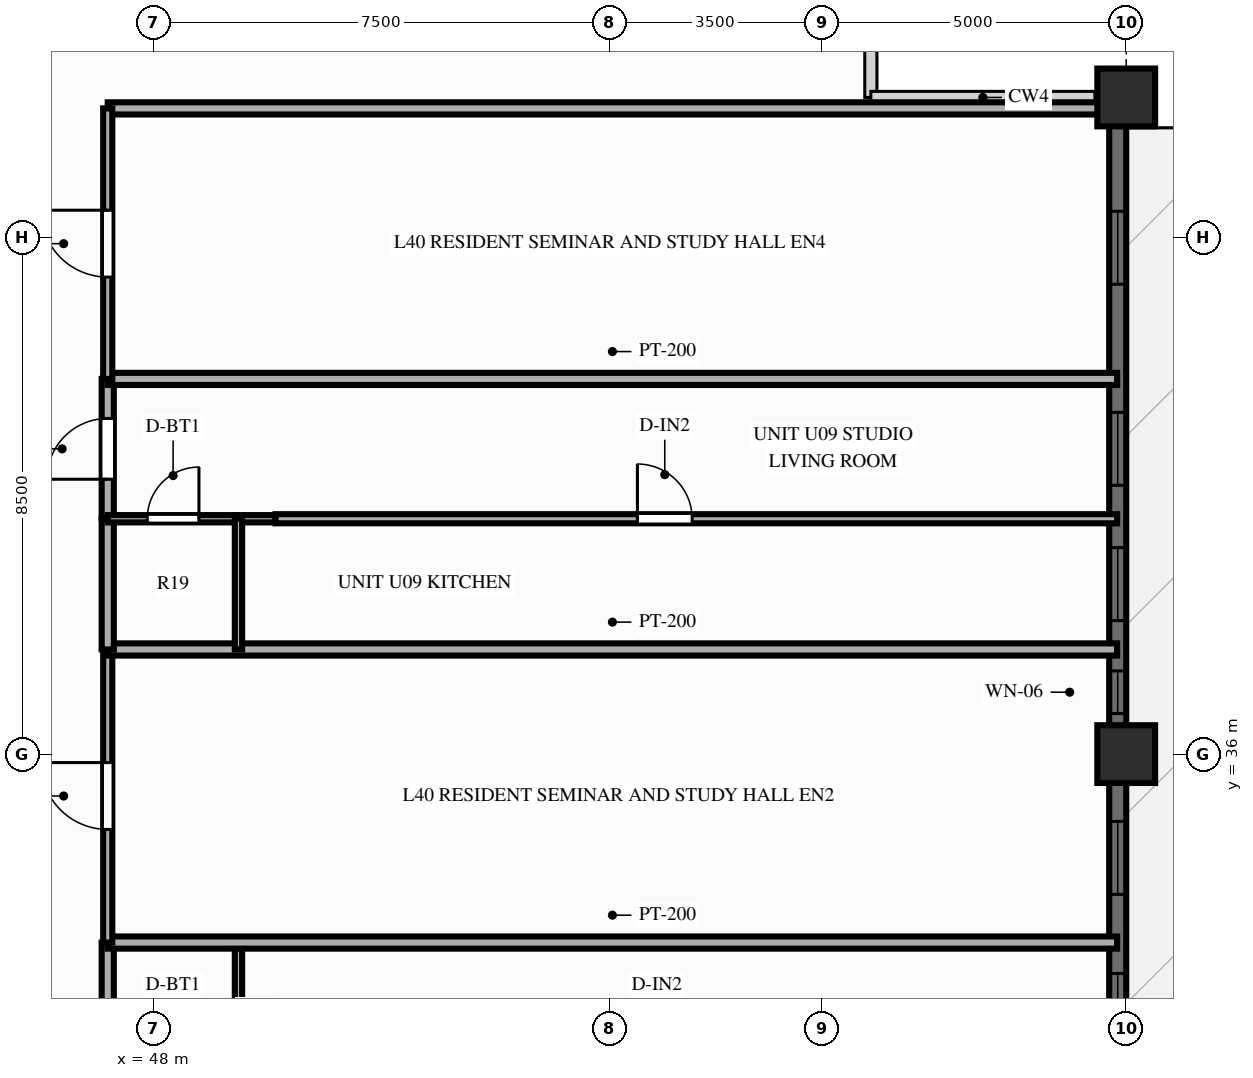
"""IFC4 building model, lengths in metres.
Left out: names, types, materials, properties, quantities, classifications, styles, units other than length and angle.
Written with IfcOpenShell. Run it as: python <this file> out.ifc"""

import sys

from ifc_helpers import new_model, si_unit, direction, frame, frame_2d, origin, origin_2d, place, context, subcontext, project, spatial, rectangle, extrude, source, transform, mapped, element, fill, save


model = new_model("IFC4")
c1 = context("Model", 3, precision=1e-05, world=origin(), true_north=direction((0.0, 1.0)))
c2 = subcontext(c1, "Body", "Model", "MODEL_VIEW")
j1 = project(units=[si_unit("LENGTHUNIT", "METRE"), si_unit("PLANEANGLEUNIT", "RADIAN")], contexts=[c1])
p1 = place(None, origin())
s1 = spatial("IfcSite", under=j1, at=p1, CompositionType="ELEMENT")
p2 = place(p1, origin())
s2 = spatial("IfcBuilding", under=s1, at=p2, CompositionType="ELEMENT")
p3 = place(p2, frame((0.0, 0.0, 126.75)))
s3 = spatial("IfcBuildingStorey", under=s2, at=p3, CompositionType="ELEMENT", Elevation=126.75)
m1 = source(origin(), c2, "Body", "SweptSolid", [
    extrude(rectangle(XDim=0.95, YDim=0.95, at=origin_2d()), origin(), (0.0, 0.0, 1.0), 3.0),
])
for number, where, z_axis, x_axis in (
    (1, (64.0, 36.0, 0.0), (0.0, 0.0, 1.0), (1.0, 0.0, 0.0)),
    (2, (64.0, 46.8, 0.0), (0.0, 0.0, 1.0), (1.0, 0.0, 0.0)),
):
    element("IfcColumn", number, at=place(p3, frame(where, z_axis=z_axis, x_axis=x_axis)), inside=s3, PredefinedType="COLUMN", context=c2, shape_type="MappedRepresentation", body=[
        mapped(m1, transform((0.0, 0.0, 0.0), scale=1.0)),
    ])
p4 = place(p3, frame((63.86, 7.2, 0.0), z_axis=(0.0, 0.0, 1.0), x_axis=(0.0, 1.0, 0.0)))
e3 = element("IfcWall", 3, at=p4, inside=s3, PredefinedType="SOLIDWALL", context=c2, shape_type="SweptSolid", body=[
    extrude(rectangle(XDim=39.6, YDim=0.28, at=frame_2d((19.8, 0.0))), origin(), (0.0, 0.0, 1.0), 2.28),
])
p5 = place(p4, frame((5.683, 0.0, 0.0), z_axis=(0.0, 0.0, 1.0), x_axis=(-1.0, 0.0, 0.0)))
e4 = element("IfcOpeningElement", 4, at=p5, cuts=e3, PredefinedType="OPENING", context=c2, shape_type="SweptSolid", body=[
    extrude(rectangle(XDim=1.6, YDim=2.15, at=frame_2d((0.8, 1.075))), frame((0.0, 0.152, 0.0), z_axis=(0.0, -1.0, 0.0), x_axis=(1.0, 0.0, 0.0)), (0.0, 0.0, 1.0), 0.304),
])
p6 = place(p4, frame((13.483, 0.0, 0.25)))
e5 = element("IfcOpeningElement", 5, at=p6, cuts=e3, PredefinedType="OPENING", context=c2, shape_type="SweptSolid", body=[
    extrude(rectangle(XDim=1.2, YDim=1.5, at=frame_2d((0.6, 0.75))), frame((0.0, 0.152, 0.0), z_axis=(0.0, -1.0, 0.0), x_axis=(1.0, 0.0, 0.0)), (0.0, 0.0, 1.0), 0.304),
])
p7 = place(p4, frame((16.82, 0.0, 0.25)))
e6 = element("IfcOpeningElement", 6, at=p7, cuts=e3, PredefinedType="OPENING", context=c2, shape_type="SweptSolid", body=[
    extrude(rectangle(XDim=1.2, YDim=1.5, at=frame_2d((0.6, 0.75))), frame((0.0, 0.152, 0.0), z_axis=(0.0, -1.0, 0.0), x_axis=(1.0, 0.0, 0.0)), (0.0, 0.0, 1.0), 0.304),
])
p8 = place(p4, frame((19.2, 0.0, 0.25)))
e7 = element("IfcOpeningElement", 7, at=p8, cuts=e3, PredefinedType="OPENING", context=c2, shape_type="SweptSolid", body=[
    extrude(rectangle(XDim=1.2, YDim=1.5, at=frame_2d((0.6, 0.75))), frame((0.0, 0.152, 0.0), z_axis=(0.0, -1.0, 0.0), x_axis=(1.0, 0.0, 0.0)), (0.0, 0.0, 1.0), 0.304),
])
p9 = place(p4, frame((21.582, 0.0, 0.25)))
e8 = element("IfcOpeningElement", 8, at=p9, cuts=e3, PredefinedType="OPENING", context=c2, shape_type="SweptSolid", body=[
    extrude(rectangle(XDim=1.2, YDim=1.5, at=frame_2d((0.6, 0.75))), frame((0.0, 0.152, 0.0), z_axis=(0.0, -1.0, 0.0), x_axis=(1.0, 0.0, 0.0)), (0.0, 0.0, 1.0), 0.304),
])
p10 = place(p4, frame((23.992, 0.0, 0.25)))
e9 = element("IfcOpeningElement", 9, at=p10, cuts=e3, PredefinedType="OPENING", context=c2, shape_type="SweptSolid", body=[
    extrude(rectangle(XDim=1.2, YDim=1.5, at=frame_2d((0.6, 0.75))), frame((0.0, 0.152, 0.0), z_axis=(0.0, -1.0, 0.0), x_axis=(1.0, 0.0, 0.0)), (0.0, 0.0, 1.0), 0.304),
])
p11 = place(p4, frame((26.493, 0.0, 0.25)))
e10 = element("IfcOpeningElement", 10, at=p11, cuts=e3, PredefinedType="OPENING", context=c2, shape_type="SweptSolid", body=[
    extrude(rectangle(XDim=1.2, YDim=1.5, at=frame_2d((0.6, 0.75))), frame((0.0, 0.152, 0.0), z_axis=(0.0, -1.0, 0.0), x_axis=(1.0, 0.0, 0.0)), (0.0, 0.0, 1.0), 0.304),
])
p12 = place(p4, frame((29.468, 0.0, 0.25)))
e11 = element("IfcOpeningElement", 11, at=p12, cuts=e3, PredefinedType="OPENING", context=c2, shape_type="SweptSolid", body=[
    extrude(rectangle(XDim=0.7, YDim=1.5, at=frame_2d((0.35, 0.75))), frame((0.0, 0.152, 0.0), z_axis=(0.0, -1.0, 0.0), x_axis=(1.0, 0.0, 0.0)), (0.0, 0.0, 1.0), 0.304),
])
p13 = place(p4, frame((30.996, 0.0, 0.25)))
e12 = element("IfcOpeningElement", 12, at=p13, cuts=e3, PredefinedType="OPENING", context=c2, shape_type="SweptSolid", body=[
    extrude(rectangle(XDim=1.2, YDim=1.5, at=frame_2d((0.6, 0.75))), frame((0.0, 0.152, 0.0), z_axis=(0.0, -1.0, 0.0), x_axis=(1.0, 0.0, 0.0)), (0.0, 0.0, 1.0), 0.304),
])
p14 = place(p4, frame((33.221, 0.0, 0.25)))
e13 = element("IfcOpeningElement", 13, at=p14, cuts=e3, PredefinedType="OPENING", context=c2, shape_type="SweptSolid", body=[
    extrude(rectangle(XDim=1.2, YDim=1.5, at=frame_2d((0.6, 0.75))), frame((0.0, 0.152, 0.0), z_axis=(0.0, -1.0, 0.0), x_axis=(1.0, 0.0, 0.0)), (0.0, 0.0, 1.0), 0.304),
])
p15 = place(p4, frame((36.528, 0.0, 0.25)))
e14 = element("IfcOpeningElement", 14, at=p15, cuts=e3, PredefinedType="OPENING", context=c2, shape_type="SweptSolid", body=[
    extrude(rectangle(XDim=1.2, YDim=1.5, at=frame_2d((0.6, 0.75))), frame((0.0, 0.152, 0.0), z_axis=(0.0, -1.0, 0.0), x_axis=(1.0, 0.0, 0.0)), (0.0, 0.0, 1.0), 0.304),
])
p16 = place(p3, frame((47.25, 46.62, 0.0), z_axis=(0.0, 0.0, 1.0), x_axis=(1.0, 0.0, 0.0)))
e15 = element("IfcWall", 15, at=p16, inside=s3, PredefinedType="PARTITIONING", context=c2, shape_type="SweptSolid", body=[
    extrude(rectangle(XDim=16.6, YDim=0.2, at=frame_2d((8.3, 0.0))), origin(), (0.0, 0.0, 1.0), 2.79),
])
p17 = place(p3, frame((47.25, 30.683, 0.0), z_axis=(0.0, 0.0, 1.0), x_axis=(0.0, 1.0, 0.0)))
e16 = element("IfcWall", 16, at=p17, inside=s3, PredefinedType="PARTITIONING", context=c2, shape_type="SweptSolid", body=[
    extrude(rectangle(XDim=2.217, YDim=0.2, at=frame_2d((1.109, 0.0))), origin(), (0.0, 0.0, 1.0), 2.79),
])
p18 = place(p3, frame((49.4, 30.683, 0.0), z_axis=(0.0, 0.0, 1.0), x_axis=(0.0, 1.0, 0.0)))
e17 = element("IfcWall", 17, at=p18, inside=s3, PredefinedType="PARTITIONING", context=c2, shape_type="SweptSolid", body=[
    extrude(rectangle(XDim=2.217, YDim=0.12, at=frame_2d((1.109, 0.0))), origin(), (0.0, 0.0, 1.0), 2.79),
])
p19 = place(p3, frame((47.25, 32.9, 0.0), z_axis=(0.0, 0.0, 1.0), x_axis=(1.0, 0.0, 0.0)))
e18 = element("IfcWall", 18, at=p19, inside=s3, PredefinedType="PARTITIONING", context=c2, shape_type="SweptSolid", body=[
    extrude(rectangle(XDim=16.6, YDim=0.2, at=frame_2d((8.3, 0.0))), origin(), (0.0, 0.0, 1.0), 2.79),
])
p20 = place(p3, frame((47.25, 32.9, 0.0), z_axis=(0.0, 0.0, 1.0), x_axis=(0.0, 1.0, 0.0)))
e19 = element("IfcWall", 19, at=p20, inside=s3, PredefinedType="PARTITIONING", context=c2, shape_type="SweptSolid", body=[
    extrude(rectangle(XDim=4.82, YDim=0.15, at=frame_2d((2.41, 0.0))), origin(), (0.0, 0.0, 1.0), 2.79),
])
p21 = place(p20, frame((1.86, 0.0, 0.0)))
e20 = element("IfcOpeningElement", 20, at=p21, cuts=e19, PredefinedType="OPENING", context=c2, shape_type="SweptSolid", body=[
    extrude(rectangle(XDim=1.1, YDim=2.15, at=frame_2d((0.55, 1.075))), frame((0.0, 0.087, 0.0), z_axis=(0.0, -1.0, 0.0), x_axis=(1.0, 0.0, 0.0)), (0.0, 0.0, 1.0), 0.174),
])
p22 = place(p3, frame((47.25, 37.721, 0.0), z_axis=(0.0, 0.0, 1.0), x_axis=(1.0, 0.0, 0.0)))
e21 = element("IfcWall", 21, at=p22, inside=s3, PredefinedType="PARTITIONING", context=c2, shape_type="SweptSolid", body=[
    extrude(rectangle(XDim=16.6, YDim=0.2, at=frame_2d((8.3, 0.0))), origin(), (0.0, 0.0, 1.0), 2.79),
])
p23 = place(p3, frame((47.25, 37.721, 0.0), z_axis=(0.0, 0.0, 1.0), x_axis=(0.0, 1.0, 0.0)))
e22 = element("IfcWall", 22, at=p23, inside=s3, PredefinedType="PARTITIONING", context=c2, shape_type="SweptSolid", body=[
    extrude(rectangle(XDim=2.15, YDim=0.2, at=frame_2d((1.075, 0.0))), origin(), (0.0, 0.0, 1.0), 2.79),
])
p24 = place(p3, frame((47.25, 39.871, 0.0), z_axis=(0.0, 0.0, 1.0), x_axis=(0.0, 1.0, 0.0)))
e23 = element("IfcWall", 23, at=p24, inside=s3, PredefinedType="PARTITIONING", context=c2, shape_type="SweptSolid", body=[
    extrude(rectangle(XDim=2.3, YDim=0.2, at=frame_2d((1.15, 0.0))), origin(), (0.0, 0.0, 1.0), 2.79),
])
p25 = place(p24, frame((0.65, 0.0, 0.0)))
e24 = element("IfcOpeningElement", 24, at=p25, cuts=e23, PredefinedType="OPENING", context=c2, shape_type="SweptSolid", body=[
    extrude(rectangle(XDim=1.0, YDim=2.15, at=frame_2d((0.5, 1.075))), frame((0.0, 0.112, 0.0), z_axis=(0.0, -1.0, 0.0), x_axis=(1.0, 0.0, 0.0)), (0.0, 0.0, 1.0), 0.224),
])
p26 = place(p3, frame((47.25, 39.871, 0.0), z_axis=(0.0, 0.0, 1.0), x_axis=(1.0, 0.0, 0.0)))
e25 = element("IfcWall", 25, at=p26, inside=s3, PredefinedType="PARTITIONING", context=c2, shape_type="SweptSolid", body=[
    extrude(rectangle(XDim=2.15, YDim=0.12, at=frame_2d((1.075, 0.0))), origin(), (0.0, 0.0, 1.0), 2.79),
])
p27 = place(p26, frame((0.65, 0.0, 0.0)))
e26 = element("IfcOpeningElement", 26, at=p27, cuts=e25, PredefinedType="OPENING", context=c2, shape_type="SweptSolid", body=[
    extrude(rectangle(XDim=0.85, YDim=2.05, at=frame_2d((0.425, 1.025))), frame((0.0, 0.072, 0.0), z_axis=(0.0, -1.0, 0.0), x_axis=(1.0, 0.0, 0.0)), (0.0, 0.0, 1.0), 0.144),
])
p28 = place(p3, frame((49.4, 39.871, 0.0), z_axis=(0.0, 0.0, 1.0), x_axis=(1.0, 0.0, 0.0)))
e27 = element("IfcWall", 27, at=p28, inside=s3, PredefinedType="PARTITIONING", context=c2, shape_type="SweptSolid", body=[
    extrude(rectangle(XDim=0.61, YDim=0.12, at=frame_2d((0.305, 0.0))), origin(), (0.0, 0.0, 1.0), 2.79),
])
p29 = place(p3, frame((49.4, 37.721, 0.0), z_axis=(0.0, 0.0, 1.0), x_axis=(0.0, 1.0, 0.0)))
e28 = element("IfcWall", 28, at=p29, inside=s3, PredefinedType="PARTITIONING", context=c2, shape_type="SweptSolid", body=[
    extrude(rectangle(XDim=2.15, YDim=0.12, at=frame_2d((1.075, 0.0))), origin(), (0.0, 0.0, 1.0), 2.79),
])
p30 = place(p3, frame((50.01, 39.871, 0.0), z_axis=(0.0, 0.0, 1.0), x_axis=(1.0, 0.0, 0.0)))
e29 = element("IfcWall", 29, at=p30, inside=s3, PredefinedType="PARTITIONING", context=c2, shape_type="SweptSolid", body=[
    extrude(rectangle(XDim=13.84, YDim=0.15, at=frame_2d((6.92, 0.0))), origin(), (0.0, 0.0, 1.0), 2.79),
])
p31 = place(p30, frame((5.951, 0.0, 0.0)))
e30 = element("IfcOpeningElement", 30, at=p31, cuts=e29, PredefinedType="OPENING", context=c2, shape_type="SweptSolid", body=[
    extrude(rectangle(XDim=0.9, YDim=2.1, at=frame_2d((0.45, 1.05))), frame((0.0, 0.087, 0.0), z_axis=(0.0, -1.0, 0.0), x_axis=(1.0, 0.0, 0.0)), (0.0, 0.0, 1.0), 0.174),
])
p32 = place(p3, frame((47.25, 42.17, 0.0), z_axis=(0.0, 0.0, 1.0), x_axis=(1.0, 0.0, 0.0)))
e31 = element("IfcWall", 31, at=p32, inside=s3, PredefinedType="PARTITIONING", context=c2, shape_type="SweptSolid", body=[
    extrude(rectangle(XDim=16.6, YDim=0.2, at=frame_2d((8.3, 0.0))), origin(), (0.0, 0.0, 1.0), 2.79),
])
p33 = place(p3, frame((47.25, 42.17, 0.0), z_axis=(0.0, 0.0, 1.0), x_axis=(0.0, 1.0, 0.0)))
e32 = element("IfcWall", 32, at=p33, inside=s3, PredefinedType="PARTITIONING", context=c2, shape_type="SweptSolid", body=[
    extrude(rectangle(XDim=4.45, YDim=0.15, at=frame_2d((2.225, 0.0))), origin(), (0.0, 0.0, 1.0), 2.79),
])
p34 = place(p33, frame((1.675, 0.0, 0.0)))
e33 = element("IfcOpeningElement", 33, at=p34, cuts=e32, PredefinedType="OPENING", context=c2, shape_type="SweptSolid", body=[
    extrude(rectangle(XDim=1.1, YDim=2.15, at=frame_2d((0.55, 1.075))), frame((0.0, 0.087, 0.0), z_axis=(0.0, -1.0, 0.0), x_axis=(1.0, 0.0, 0.0)), (0.0, 0.0, 1.0), 0.174),
])
m2 = source(origin(), c2, "Body", "SweptSolid", [
    extrude(rectangle(XDim=1.2, YDim=1.5, at=frame_2d((0.6, 0.75))), frame((0.0, 0.03, 0.0), z_axis=(0.0, -1.0, 0.0), x_axis=(1.0, 0.0, 0.0)), (0.0, 0.0, 1.0), 0.06),
])
p35 = place(p10, origin())
e34 = element("IfcWindow", 34, at=p35, inside=s3, PartitioningType="SINGLE_PANEL", PredefinedType="WINDOW", context=c2, shape_type="MappedRepresentation", body=[
    mapped(m2, transform((0.0, 0.0, 0.0), scale=1.0)),
])
fill(e9, e34)
p36 = place(p11, origin())
e35 = element("IfcWindow", 35, at=p36, inside=s3, PartitioningType="SINGLE_PANEL", PredefinedType="WINDOW", context=c2, shape_type="MappedRepresentation", body=[
    mapped(m2, transform((0.0, 0.0, 0.0), scale=1.0)),
])
fill(e10, e35)
m3 = source(origin(), c2, "Body", "SweptSolid", [
    extrude(rectangle(XDim=0.7, YDim=1.5, at=frame_2d((0.35, 0.75))), frame((0.0, 0.03, 0.0), z_axis=(0.0, -1.0, 0.0), x_axis=(1.0, 0.0, 0.0)), (0.0, 0.0, 1.0), 0.06),
])
p37 = place(p12, origin())
e36 = element("IfcWindow", 36, at=p37, inside=s3, PartitioningType="SINGLE_PANEL", PredefinedType="WINDOW", context=c2, shape_type="MappedRepresentation", body=[
    mapped(m3, transform((0.0, 0.0, 0.0), scale=1.0)),
])
fill(e11, e36)
p38 = place(p13, origin())
e37 = element("IfcWindow", 37, at=p38, inside=s3, PartitioningType="SINGLE_PANEL", PredefinedType="WINDOW", context=c2, shape_type="MappedRepresentation", body=[
    mapped(m2, transform((0.0, 0.0, 0.0), scale=1.0)),
])
fill(e12, e37)
p39 = place(p14, origin())
e38 = element("IfcWindow", 38, at=p39, inside=s3, PartitioningType="SINGLE_PANEL", PredefinedType="WINDOW", context=c2, shape_type="MappedRepresentation", body=[
    mapped(m2, transform((0.0, 0.0, 0.0), scale=1.0)),
])
fill(e13, e38)
p40 = place(p15, origin())
e39 = element("IfcWindow", 39, at=p40, inside=s3, PartitioningType="SINGLE_PANEL", PredefinedType="WINDOW", context=c2, shape_type="MappedRepresentation", body=[
    mapped(m2, transform((0.0, 0.0, 0.0), scale=1.0)),
])
fill(e14, e39)
m4 = source(origin(), c2, "Body", "SweptSolid", [
    extrude(rectangle(XDim=1.1, YDim=2.15, at=frame_2d((0.55, 1.075))), frame((0.0, 0.025, 0.0), z_axis=(0.0, -1.0, 0.0), x_axis=(1.0, 0.0, 0.0)), (0.0, 0.0, 1.0), 0.05),
])
p41 = place(p21, origin())
e40 = element("IfcDoor", 40, at=p41, inside=s3, OperationType="SINGLE_SWING_RIGHT", PredefinedType="DOOR", context=c2, shape_type="MappedRepresentation", body=[
    mapped(m4, transform((0.0, 0.0, 0.0), scale=1.0)),
])
fill(e20, e40)
m5 = source(origin(), c2, "Body", "SweptSolid", [
    extrude(rectangle(XDim=1.0, YDim=2.15, at=frame_2d((0.5, 1.075))), frame((0.0, 0.025, 0.0), z_axis=(0.0, -1.0, 0.0), x_axis=(1.0, 0.0, 0.0)), (0.0, 0.0, 1.0), 0.05),
])
p42 = place(p25, origin())
e41 = element("IfcDoor", 41, at=p42, inside=s3, OperationType="SINGLE_SWING_LEFT", PredefinedType="DOOR", context=c2, shape_type="MappedRepresentation", body=[
    mapped(m5, transform((0.0, 0.0, 0.0), scale=1.0)),
])
fill(e24, e41)
m6 = source(origin(), c2, "Body", "SweptSolid", [
    extrude(rectangle(XDim=0.85, YDim=2.05, at=frame_2d((0.425, 1.025))), frame((0.0, 0.025, 0.0), z_axis=(0.0, -1.0, 0.0), x_axis=(1.0, 0.0, 0.0)), (0.0, 0.0, 1.0), 0.05),
])
p43 = place(p27, origin())
e42 = element("IfcDoor", 42, at=p43, inside=s3, OperationType="SINGLE_SWING_RIGHT", PredefinedType="DOOR", context=c2, shape_type="MappedRepresentation", body=[
    mapped(m6, transform((0.0, 0.0, 0.0), scale=1.0)),
])
fill(e26, e42)
m7 = source(origin(), c2, "Body", "SweptSolid", [
    extrude(rectangle(XDim=0.9, YDim=2.1, at=frame_2d((0.45, 1.05))), frame((0.0, 0.025, 0.0), z_axis=(0.0, -1.0, 0.0), x_axis=(1.0, 0.0, 0.0)), (0.0, 0.0, 1.0), 0.05),
])
p44 = place(p31, origin())
e43 = element("IfcDoor", 43, at=p44, inside=s3, OperationType="SINGLE_SWING_LEFT", PredefinedType="DOOR", context=c2, shape_type="MappedRepresentation", body=[
    mapped(m7, transform((0.0, 0.0, 0.0), scale=1.0)),
])
fill(e30, e43)
p45 = place(p34, origin())
e44 = element("IfcDoor", 44, at=p45, inside=s3, OperationType="SINGLE_SWING_RIGHT", PredefinedType="DOOR", context=c2, shape_type="MappedRepresentation", body=[
    mapped(m4, transform((0.0, 0.0, 0.0), scale=1.0)),
])
fill(e33, e44)
save(model, sys.argv[1])
